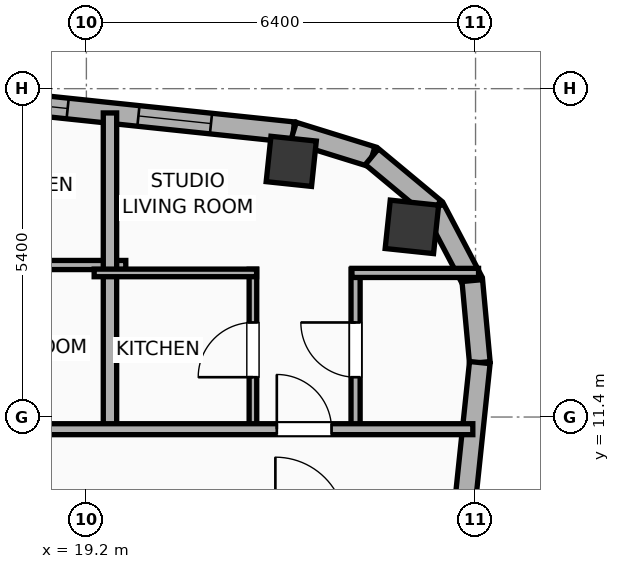
"""IFC4 building model, lengths in metres.
Left out: names, types, materials, properties, quantities, classifications, styles, units other than length and angle.
Written with IfcOpenShell. Run it as: python <this file> out.ifc"""

import sys

from ifc_helpers import new_model, si_unit, direction, frame, frame_2d, origin, origin_2d, place, context, subcontext, project, spatial, rectangle, hollow_rectangle, hollow_circle, extrude, element, fill, save


model = new_model("IFC4")
c1 = context("Model", 3, precision=1e-05, world=origin(), true_north=direction((0.0, 1.0)))
c2 = subcontext(c1, "Body", "Model", "MODEL_VIEW")
j1 = project(units=[si_unit("LENGTHUNIT", "METRE"), si_unit("PLANEANGLEUNIT", "RADIAN")], contexts=[c1])
p1 = place(None, origin())
s1 = spatial("IfcSite", under=j1, at=p1, CompositionType="ELEMENT")
p2 = place(p1, origin())
s2 = spatial("IfcBuilding", under=s1, at=p2, CompositionType="ELEMENT")
p3 = place(p2, frame((0.0, 0.0, 287.3)))
s3 = spatial("IfcBuildingStorey", under=s2, at=p3, CompositionType="ELEMENT", Elevation=287.3)
p4 = place(p3, frame((24.553, 14.527, 0.0), z_axis=(0.0, 0.0, 1.0), x_axis=(0.994521895368, -0.104528463268, 0.0)))
e1 = element("IfcColumn", 1, at=p4, inside=s3, PredefinedType="COLUMN", context=c2, shape_type="SweptSolid", body=[
    extrude(hollow_circle(Radius=0.4, WallThickness=0.028, at=origin_2d()), origin(), (0.0, 0.0, 1.0), 3.9),
])
p5 = place(p3, frame((22.569, 15.604, 0.0), z_axis=(0.0, 0.0, 1.0), x_axis=(0.994521895368, -0.104528463268, 0.0)))
e2 = element("IfcColumn", 2, at=p5, inside=s3, PredefinedType="COLUMN", context=c2, shape_type="SweptSolid", body=[
    extrude(hollow_rectangle(XDim=0.75, YDim=0.75, WallThickness=0.025, at=origin_2d()), origin(), (0.0, 0.0, 1.0), 3.9),
])
p6 = place(p3, frame((-23.908, 20.972, 0.0), z_axis=(0.0, 0.0, 1.0), x_axis=(0.994521888554, -0.104528528102, 0.0)))
e3 = element("IfcWall", 3, at=p6, inside=s3, PredefinedType="ELEMENTEDWALL", context=c2, shape_type="SweptSolid", body=[
    extrude(rectangle(XDim=46.766, YDim=0.34, at=frame_2d((23.383, 0.0))), origin(), (0.0, 0.0, 1.0), 3.635),
])
p7 = place(p6, frame((22.183, 0.0, 0.75)))
e4 = element("IfcOpeningElement", 4, at=p7, cuts=e3, PredefinedType="OPENING", context=c2, shape_type="SweptSolid", body=[
    extrude(rectangle(XDim=2.4, YDim=2.1, at=frame_2d((1.2, 1.05))), frame((0.0, 0.18, 0.0), z_axis=(0.0, -1.0, 0.0), x_axis=(1.0, 0.0, 0.0)), (0.0, 0.0, 1.0), 0.36),
])
p8 = place(p6, frame((4.49, 0.0, 0.75)))
e5 = element("IfcOpeningElement", 5, at=p8, cuts=e3, PredefinedType="OPENING", context=c2, shape_type="SweptSolid", body=[
    extrude(rectangle(XDim=1.2, YDim=2.05, at=frame_2d((0.6, 1.025))), frame((0.0, 0.18, 0.0), z_axis=(0.0, -1.0, 0.0), x_axis=(1.0, 0.0, 0.0)), (0.0, 0.0, 1.0), 0.36),
])
p9 = place(p6, frame((1.657, 0.0, 0.75)))
e6 = element("IfcOpeningElement", 6, at=p9, cuts=e3, PredefinedType="OPENING", context=c2, shape_type="SweptSolid", body=[
    extrude(rectangle(XDim=1.2, YDim=2.05, at=frame_2d((0.6, 1.025))), frame((0.0, 0.18, 0.0), z_axis=(0.0, -1.0, 0.0), x_axis=(1.0, 0.0, 0.0)), (0.0, 0.0, 1.0), 0.36),
])
p10 = place(p6, frame((9.885, 0.0, 0.75)))
e7 = element("IfcOpeningElement", 7, at=p10, cuts=e3, PredefinedType="OPENING", context=c2, shape_type="SweptSolid", body=[
    extrude(rectangle(XDim=1.2, YDim=2.05, at=frame_2d((0.6, 1.025))), frame((0.0, 0.18, 0.0), z_axis=(0.0, -1.0, 0.0), x_axis=(1.0, 0.0, 0.0)), (0.0, 0.0, 1.0), 0.36),
])
p11 = place(p6, frame((16.427, 0.0, 0.75)))
e8 = element("IfcOpeningElement", 8, at=p11, cuts=e3, PredefinedType="OPENING", context=c2, shape_type="SweptSolid", body=[
    extrude(rectangle(XDim=1.2, YDim=2.05, at=frame_2d((0.6, 1.025))), frame((0.0, 0.18, 0.0), z_axis=(0.0, -1.0, 0.0), x_axis=(1.0, 0.0, 0.0)), (0.0, 0.0, 1.0), 0.36),
])
p12 = place(p6, frame((13.159, 0.0, 0.75)))
e9 = element("IfcOpeningElement", 9, at=p12, cuts=e3, PredefinedType="OPENING", context=c2, shape_type="SweptSolid", body=[
    extrude(rectangle(XDim=1.2, YDim=2.05, at=frame_2d((0.6, 1.025))), frame((0.0, 0.18, 0.0), z_axis=(0.0, -1.0, 0.0), x_axis=(1.0, 0.0, 0.0)), (0.0, 0.0, 1.0), 0.36),
])
p13 = place(p6, frame((19.586, 0.0, 0.75)))
e10 = element("IfcOpeningElement", 10, at=p13, cuts=e3, PredefinedType="OPENING", context=c2, shape_type="SweptSolid", body=[
    extrude(rectangle(XDim=1.2, YDim=2.05, at=frame_2d((0.6, 1.025))), frame((0.0, 0.18, 0.0), z_axis=(0.0, -1.0, 0.0), x_axis=(1.0, 0.0, 0.0)), (0.0, 0.0, 1.0), 0.36),
])
p14 = place(p6, frame((28.687, 0.0, 0.75)))
e11 = element("IfcOpeningElement", 11, at=p14, cuts=e3, PredefinedType="OPENING", context=c2, shape_type="SweptSolid", body=[
    extrude(rectangle(XDim=1.2, YDim=2.05, at=frame_2d((0.6, 1.025))), frame((0.0, 0.18, 0.0), z_axis=(0.0, -1.0, 0.0), x_axis=(1.0, 0.0, 0.0)), (0.0, 0.0, 1.0), 0.36),
])
p15 = place(p6, frame((34.0, 0.0, 0.75)))
e12 = element("IfcOpeningElement", 12, at=p15, cuts=e3, PredefinedType="OPENING", context=c2, shape_type="SweptSolid", body=[
    extrude(rectangle(XDim=1.2, YDim=2.05, at=frame_2d((0.6, 1.025))), frame((0.0, 0.18, 0.0), z_axis=(0.0, -1.0, 0.0), x_axis=(1.0, 0.0, 0.0)), (0.0, 0.0, 1.0), 0.36),
])
p16 = place(p6, frame((38.775, 0.0, 0.75)))
e13 = element("IfcOpeningElement", 13, at=p16, cuts=e3, PredefinedType="OPENING", context=c2, shape_type="SweptSolid", body=[
    extrude(rectangle(XDim=1.2, YDim=2.05, at=frame_2d((0.6, 1.025))), frame((0.0, 0.18, 0.0), z_axis=(0.0, -1.0, 0.0), x_axis=(1.0, 0.0, 0.0)), (0.0, 0.0, 1.0), 0.36),
])
p17 = place(p6, frame((41.836, 0.0, 0.75)))
e14 = element("IfcOpeningElement", 14, at=p17, cuts=e3, PredefinedType="OPENING", context=c2, shape_type="SweptSolid", body=[
    extrude(rectangle(XDim=1.2, YDim=2.05, at=frame_2d((0.6, 1.025))), frame((0.0, 0.18, 0.0), z_axis=(0.0, -1.0, 0.0), x_axis=(1.0, 0.0, 0.0)), (0.0, 0.0, 1.0), 0.36),
])
p18 = place(p6, frame((44.206, 0.0, 0.75)))
e15 = element("IfcOpeningElement", 15, at=p18, cuts=e3, PredefinedType="OPENING", context=c2, shape_type="SweptSolid", body=[
    extrude(rectangle(XDim=1.2, YDim=2.05, at=frame_2d((0.6, 1.025))), frame((0.0, 0.18, 0.0), z_axis=(0.0, -1.0, 0.0), x_axis=(1.0, 0.0, 0.0)), (0.0, 0.0, 1.0), 0.36),
])
p19 = place(p3, frame((22.603, 16.084, 0.0), z_axis=(0.0, 0.0, 1.0), x_axis=(0.955007802701, -0.296580674994, 0.0)))
e16 = element("IfcWall", 16, at=p19, inside=s3, PredefinedType="ELEMENTEDWALL", context=c2, shape_type="SweptSolid", body=[
    extrude(rectangle(XDim=1.354, YDim=0.34, at=frame_2d((0.677, 0.0))), origin(), (0.0, 0.0, 1.0), 3.635),
])
for number, where, z_axis, x_axis in (
    (17, (23.896, 15.682, 0.0), (0.0, 0.0, 1.0), (0.769, -0.64, 0.0)),
    (18, (24.924, 14.827, 0.0), (0.0, 0.0, 1.0), (0.466, -0.885, 0.0)),
):
    element("IfcWall", number, at=place(p3, frame(where, z_axis=z_axis, x_axis=x_axis)), inside=s3, PredefinedType="ELEMENTEDWALL", context=c2, shape_type="SweptSolid", body=[
        extrude(rectangle(XDim=1.337, YDim=0.34, at=frame_2d((0.668, 0.0))), origin(), (0.0, 0.0, 1.0), 3.635),
    ])
p20 = place(p3, frame((25.546, 13.644, 0.0), z_axis=(0.0, 0.0, 1.0), x_axis=(0.091592370975, -0.995796584438, 0.0)))
e19 = element("IfcWall", 19, at=p20, inside=s3, PredefinedType="ELEMENTEDWALL", context=c2, shape_type="SweptSolid", body=[
    extrude(rectangle(XDim=1.354, YDim=0.34, at=frame_2d((0.677, 0.0))), origin(), (0.0, 0.0, 1.0), 3.635),
])
p21 = place(p3, frame((25.67, 12.296, 0.0), z_axis=(0.0, 0.0, 1.0), x_axis=(-0.104533282919, -0.994521388791, 0.0)))
e20 = element("IfcWall", 20, at=p21, inside=s3, PredefinedType="ELEMENTEDWALL", context=c2, shape_type="SweptSolid", body=[
    extrude(rectangle(XDim=30.366, YDim=0.34, at=frame_2d((15.183, 0.0))), origin(), (0.0, 0.0, 1.0), 3.635),
])
p22 = place(p21, frame((5.842, 0.0, 0.75)))
e21 = element("IfcOpeningElement", 21, at=p22, cuts=e20, PredefinedType="OPENING", context=c2, shape_type="SweptSolid", body=[
    extrude(rectangle(XDim=1.8, YDim=2.1, at=frame_2d((0.9, 1.05))), frame((0.0, 0.18, 0.0), z_axis=(0.0, -1.0, 0.0), x_axis=(1.0, 0.0, 0.0)), (0.0, 0.0, 1.0), 0.36),
])
p23 = place(p21, frame((18.382, 0.0, 0.75)))
e22 = element("IfcOpeningElement", 22, at=p23, cuts=e20, PredefinedType="OPENING", context=c2, shape_type="SweptSolid", body=[
    extrude(rectangle(XDim=1.2, YDim=2.05, at=frame_2d((0.6, 1.025))), frame((0.0, 0.18, 0.0), z_axis=(0.0, -1.0, 0.0), x_axis=(1.0, 0.0, 0.0)), (0.0, 0.0, 1.0), 0.36),
])
p24 = place(p3, frame((16.918, 13.9, 0.0), z_axis=(0.0, 0.0, 1.0), x_axis=(1.0, 0.0, 0.0)))
e23 = element("IfcWall", 23, at=p24, inside=s3, PredefinedType="PLUMBINGWALL", context=c2, shape_type="SweptSolid", body=[
    extrude(rectangle(XDim=2.93, YDim=0.15, at=frame_2d((1.465, 0.0))), origin(), (0.0, 0.0, 1.0), 3.635),
])
p25 = place(p3, frame((19.588, 11.12, 0.0), z_axis=(0.0, 0.0, 1.0), x_axis=(0.0, 1.0, 0.0)))
e24 = element("IfcWall", 24, at=p25, inside=s3, PredefinedType="PARTITIONING", context=c2, shape_type="SweptSolid", body=[
    extrude(rectangle(XDim=5.281, YDim=0.22, at=frame_2d((2.64, 0.0))), origin(), (0.0, 0.0, 1.0), 3.635),
])
p26 = place(p3, frame((21.939, 11.18, 0.0), z_axis=(0.0, 0.0, 1.0), x_axis=(0.0, 1.0, 0.0)))
e25 = element("IfcWall", 25, at=p26, inside=s3, PredefinedType="PARTITIONING", context=c2, shape_type="SweptSolid", body=[
    extrude(rectangle(XDim=2.65, YDim=0.125, at=frame_2d((1.325, 0.0))), origin(), (0.0, 0.0, 1.0), 3.075),
])
p27 = place(p26, frame((0.875, 0.0, 0.0)))
e26 = element("IfcOpeningElement", 26, at=p27, cuts=e25, PredefinedType="OPENING", context=c2, shape_type="SweptSolid", body=[
    extrude(rectangle(XDim=0.9, YDim=2.05, at=frame_2d((0.45, 1.025))), frame((0.0, 0.073, 0.0), z_axis=(0.0, -1.0, 0.0), x_axis=(1.0, 0.0, 0.0)), (0.0, 0.0, 1.0), 0.145),
])
p28 = place(p3, frame((23.627, 11.18, 0.0), z_axis=(0.0, 0.0, 1.0), x_axis=(0.0, 1.0, 0.0)))
e27 = element("IfcWall", 27, at=p28, inside=s3, PredefinedType="PLUMBINGWALL", context=c2, shape_type="SweptSolid", body=[
    extrude(rectangle(XDim=2.65, YDim=0.15, at=frame_2d((1.325, 0.0))), origin(), (0.0, 0.0, 1.0), 3.635),
])
p29 = place(p28, frame((0.875, 0.0, 0.0)))
e28 = element("IfcOpeningElement", 28, at=p29, cuts=e27, PredefinedType="OPENING", context=c2, shape_type="SweptSolid", body=[
    extrude(rectangle(XDim=0.9, YDim=2.05, at=frame_2d((0.45, 1.025))), frame((0.0, 0.085, 0.0), z_axis=(0.0, -1.0, 0.0), x_axis=(1.0, 0.0, 0.0)), (0.0, 0.0, 1.0), 0.17),
])
p30 = place(p3, frame((19.328, 13.77, 0.0), z_axis=(0.0, 0.0, 1.0), x_axis=(1.0, 0.0, 0.0)))
e29 = element("IfcWall", 29, at=p30, inside=s3, PredefinedType="PARTITIONING", context=c2, shape_type="SweptSolid", body=[
    extrude(rectangle(XDim=2.671, YDim=0.125, at=frame_2d((1.335, 0.0))), origin(), (0.0, 0.0, 1.0), 3.635),
])
p31 = place(p3, frame((23.567, 13.77, 0.0), z_axis=(0.0, 0.0, 1.0), x_axis=(1.0, 0.0, 0.0)))
e30 = element("IfcWall", 30, at=p31, inside=s3, PredefinedType="PLUMBINGWALL", context=c2, shape_type="SweptSolid", body=[
    extrude(rectangle(XDim=2.083, YDim=0.15, at=frame_2d((1.041, 0.0))), origin(), (0.0, 0.0, 1.0), 3.635),
])
p32 = place(p3, frame((-28.401, 11.2, 0.0), z_axis=(0.0, 0.0, 1.0), x_axis=(1.0, 0.0, 0.0)))
e31 = element("IfcWall", 31, at=p32, inside=s3, PredefinedType="PARTITIONING", context=c2, shape_type="SweptSolid", body=[
    extrude(rectangle(XDim=53.956, YDim=0.18, at=frame_2d((26.978, 0.0))), origin(), (0.0, 0.0, 1.0), 3.635),
])
p33 = place(p32, frame((2.512, 0.0, 0.0)))
e32 = element("IfcOpeningElement", 32, at=p33, cuts=e31, PredefinedType="OPENING", context=c2, shape_type="SweptSolid", body=[
    extrude(rectangle(XDim=0.9, YDim=2.05, at=frame_2d((0.45, 1.025))), frame((0.0, 0.1, 0.0), z_axis=(0.0, -1.0, 0.0), x_axis=(1.0, 0.0, 0.0)), (0.0, 0.0, 1.0), 0.2),
])
p34 = place(p32, frame((8.948, 0.0, 0.0)))
e33 = element("IfcOpeningElement", 33, at=p34, cuts=e31, PredefinedType="OPENING", context=c2, shape_type="SweptSolid", body=[
    extrude(rectangle(XDim=1.15, YDim=2.05, at=frame_2d((0.575, 1.025))), frame((0.0, 0.1, 0.0), z_axis=(0.0, -1.0, 0.0), x_axis=(1.0, 0.0, 0.0)), (0.0, 0.0, 1.0), 0.2),
])
p35 = place(p32, frame((13.821, 0.0, 0.0)))
e34 = element("IfcOpeningElement", 34, at=p35, cuts=e31, PredefinedType="OPENING", context=c2, shape_type="SweptSolid", body=[
    extrude(rectangle(XDim=0.9, YDim=2.05, at=frame_2d((0.45, 1.025))), frame((0.0, 0.1, 0.0), z_axis=(0.0, -1.0, 0.0), x_axis=(1.0, 0.0, 0.0)), (0.0, 0.0, 1.0), 0.2),
])
p36 = place(p32, frame((20.818, 0.0, 0.0)))
e35 = element("IfcOpeningElement", 35, at=p36, cuts=e31, PredefinedType="OPENING", context=c2, shape_type="SweptSolid", body=[
    extrude(rectangle(XDim=1.15, YDim=2.05, at=frame_2d((0.575, 1.025))), frame((0.0, 0.1, 0.0), z_axis=(0.0, -1.0, 0.0), x_axis=(1.0, 0.0, 0.0)), (0.0, 0.0, 1.0), 0.2),
])
p37 = place(p32, frame((27.212, 0.0, 0.0)))
e36 = element("IfcOpeningElement", 36, at=p37, cuts=e31, PredefinedType="OPENING", context=c2, shape_type="SweptSolid", body=[
    extrude(rectangle(XDim=1.15, YDim=2.05, at=frame_2d((0.575, 1.025))), frame((0.0, 0.1, 0.0), z_axis=(0.0, -1.0, 0.0), x_axis=(1.0, 0.0, 0.0)), (0.0, 0.0, 1.0), 0.2),
])
p38 = place(p32, frame((32.576, 0.0, 0.0)))
e37 = element("IfcOpeningElement", 37, at=p38, cuts=e31, PredefinedType="OPENING", context=c2, shape_type="SweptSolid", body=[
    extrude(rectangle(XDim=0.9, YDim=2.05, at=frame_2d((0.45, 1.025))), frame((0.0, 0.1, 0.0), z_axis=(0.0, -1.0, 0.0), x_axis=(1.0, 0.0, 0.0)), (0.0, 0.0, 1.0), 0.2),
])
p39 = place(p32, frame((38.576, 0.0, 0.0)))
e38 = element("IfcOpeningElement", 38, at=p39, cuts=e31, PredefinedType="OPENING", context=c2, shape_type="SweptSolid", body=[
    extrude(rectangle(XDim=0.9, YDim=2.05, at=frame_2d((0.45, 1.025))), frame((0.0, 0.1, 0.0), z_axis=(0.0, -1.0, 0.0), x_axis=(1.0, 0.0, 0.0)), (0.0, 0.0, 1.0), 0.2),
])
p40 = place(p32, frame((43.102, 0.0, 0.0)))
e39 = element("IfcOpeningElement", 39, at=p40, cuts=e31, PredefinedType="OPENING", context=c2, shape_type="SweptSolid", body=[
    extrude(rectangle(XDim=1.15, YDim=2.05, at=frame_2d((0.575, 1.025))), frame((0.0, 0.1, 0.0), z_axis=(0.0, -1.0, 0.0), x_axis=(1.0, 0.0, 0.0)), (0.0, 0.0, 1.0), 0.2),
])
p41 = place(p32, frame((50.732, 0.0, 0.0)))
e40 = element("IfcOpeningElement", 40, at=p41, cuts=e31, PredefinedType="OPENING", context=c2, shape_type="SweptSolid", body=[
    extrude(rectangle(XDim=0.9, YDim=2.05, at=frame_2d((0.45, 1.025))), frame((0.0, 0.1, 0.0), z_axis=(0.0, -1.0, 0.0), x_axis=(1.0, 0.0, 0.0)), (0.0, 0.0, 1.0), 0.2),
])
p42 = place(p17, origin())
e41 = element("IfcWindow", 41, at=p42, inside=s3, PartitioningType="SINGLE_PANEL", PredefinedType="WINDOW", context=c2, shape_type="SweptSolid", body=[
    extrude(rectangle(XDim=1.2, YDim=2.05, at=frame_2d((0.6, 1.025))), frame((0.0, 0.03, 0.0), z_axis=(0.0, -1.0, 0.0), x_axis=(1.0, 0.0, 0.0)), (0.0, 0.0, 1.0), 0.06),
])
fill(e14, e41)
p43 = place(p18, origin())
e42 = element("IfcWindow", 42, at=p43, inside=s3, PartitioningType="SINGLE_PANEL", PredefinedType="WINDOW", context=c2, shape_type="SweptSolid", body=[
    extrude(rectangle(XDim=1.2, YDim=2.05, at=frame_2d((0.6, 1.025))), frame((0.0, 0.03, 0.0), z_axis=(0.0, -1.0, 0.0), x_axis=(1.0, 0.0, 0.0)), (0.0, 0.0, 1.0), 0.06),
])
fill(e15, e42)
p44 = place(p27, origin())
e43 = element("IfcDoor", 43, at=p44, inside=s3, OperationType="SINGLE_SWING_LEFT", PredefinedType="DOOR", context=c2, shape_type="SweptSolid", body=[
    extrude(rectangle(XDim=0.9, YDim=2.05, at=frame_2d((0.45, 1.025))), frame((0.0, 0.025, 0.0), z_axis=(0.0, -1.0, 0.0), x_axis=(1.0, 0.0, 0.0)), (0.0, 0.0, 1.0), 0.05),
])
fill(e26, e43)
p45 = place(p29, origin())
e44 = element("IfcDoor", 44, at=p45, inside=s3, OperationType="SINGLE_SWING_RIGHT", PredefinedType="DOOR", context=c2, shape_type="SweptSolid", body=[
    extrude(rectangle(XDim=0.9, YDim=2.05, at=frame_2d((0.45, 1.025))), frame((0.0, 0.025, 0.0), z_axis=(0.0, -1.0, 0.0), x_axis=(1.0, 0.0, 0.0)), (0.0, 0.0, 1.0), 0.05),
])
fill(e28, e44)
p46 = place(p41, origin())
e45 = element("IfcDoor", 45, at=p46, inside=s3, OperationType="SINGLE_SWING_LEFT", PredefinedType="DOOR", context=c2, shape_type="SweptSolid", body=[
    extrude(rectangle(XDim=0.9, YDim=2.05, at=frame_2d((0.45, 1.025))), frame((0.0, 0.025, 0.0), z_axis=(0.0, -1.0, 0.0), x_axis=(1.0, 0.0, 0.0)), (0.0, 0.0, 1.0), 0.05),
])
fill(e40, e45)
save(model, sys.argv[1])
